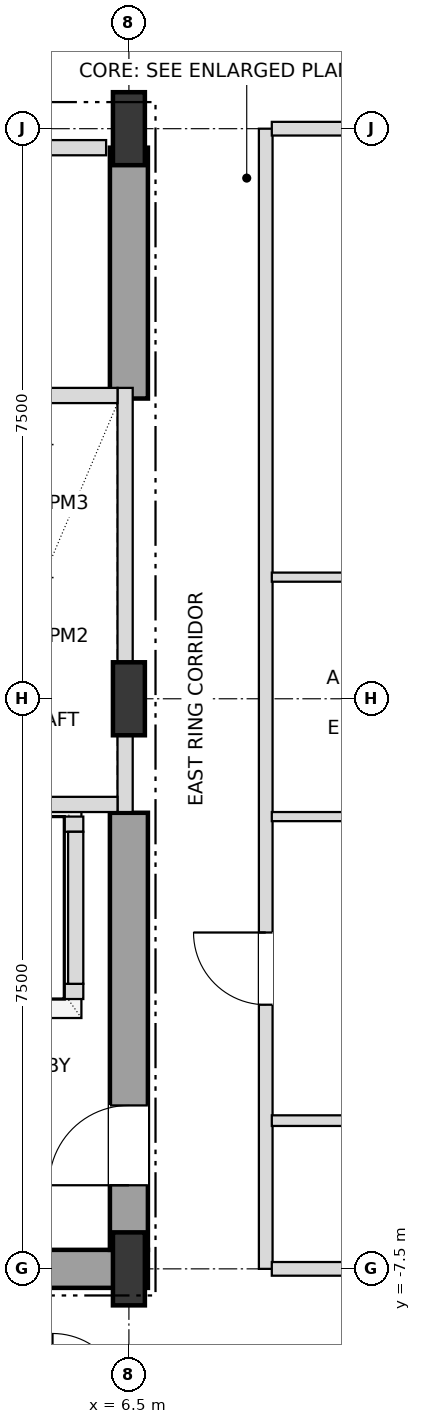
"""IFC4 building model, lengths in metres.
Left out: names, types, materials, properties, quantities, classifications, styles, units other than length and angle.
Written with IfcOpenShell. Run it as: python <this file> out.ifc"""

import sys

from ifc_helpers import new_model, si_unit, direction, frame, frame_2d, origin, origin_2d, place, context, subcontext, project, spatial, rectangle, i_section, extrude, element, fill, save


model = new_model("IFC4")
c1 = context("Model", 3, precision=1e-05, world=origin(), true_north=direction((0.0, 1.0)))
c2 = subcontext(c1, "Body", "Model", "MODEL_VIEW")
j1 = project(units=[si_unit("LENGTHUNIT", "METRE"), si_unit("PLANEANGLEUNIT", "RADIAN")], contexts=[c1])
p1 = place(None, origin())
s1 = spatial("IfcSite", under=j1, at=p1, CompositionType="ELEMENT")
p2 = place(p1, origin())
s2 = spatial("IfcBuilding", under=s1, at=p2, CompositionType="ELEMENT")
p3 = place(p2, frame((0.0, 0.0, 36.0)))
s3 = spatial("IfcBuildingStorey", under=s2, at=p3, CompositionType="ELEMENT", Elevation=36.0)
for number, where, z_axis, x_axis in (
    (1, (6.5, -7.5, 0.0), (0.0, 0.0, 1.0), (1.0, 0.0, 0.0)),
    (2, (6.5, 0.0, 0.0), (0.0, 0.0, 1.0), (1.0, 0.0, 0.0)),
    (3, (6.5, 7.5, 0.0), (0.0, 0.0, 1.0), (1.0, 0.0, 0.0)),
):
    element("IfcColumn", number, at=place(p3, frame(where, z_axis=z_axis, x_axis=x_axis)), inside=s3, PredefinedType="COLUMN", context=c2, shape_type="SweptSolid", body=[
        extrude(i_section(OverallWidth=0.42, OverallDepth=0.96, WebThickness=0.022, FlangeThickness=0.034, at=origin_2d()), origin(), (0.0, 0.0, 1.0), 3.6),
    ])
p4 = place(p3, frame((0.0, -7.5, 0.0), z_axis=(0.0, 0.0, 1.0), x_axis=(1.0, 0.0, 0.0)))
e4 = element("IfcWall", 4, at=p4, inside=s3, PredefinedType="SHEAR", context=c2, shape_type="SweptSolid", body=[
    extrude(rectangle(XDim=6.75, YDim=0.5, at=frame_2d((3.375, 0.0))), origin(), (0.0, 0.0, 1.0), 3.38),
])
p5 = place(p3, frame((6.5, -7.25, 0.0), z_axis=(0.0, 0.0, 1.0), x_axis=(0.0, 1.0, 0.0)))
e5 = element("IfcWall", 5, at=p5, inside=s3, PredefinedType="SHEAR", context=c2, shape_type="SweptSolid", body=[
    extrude(rectangle(XDim=5.75, YDim=0.5, at=frame_2d((2.875, 0.0))), origin(), (0.0, 0.0, 1.0), 3.38),
])
p6 = place(p5, frame((0.85, 0.0, 0.0)))
e6 = element("IfcOpeningElement", 6, at=p6, cuts=e5, PredefinedType="OPENING", context=c2, shape_type="SweptSolid", body=[
    extrude(rectangle(XDim=1.05, YDim=2.15, at=frame_2d((0.525, 1.075))), frame((0.0, 0.26, 0.0), z_axis=(0.0, -1.0, 0.0), x_axis=(1.0, 0.0, 0.0)), (0.0, 0.0, 1.0), 0.52),
])
p7 = place(p3, frame((6.5, 3.95, 0.0), z_axis=(0.0, 0.0, 1.0), x_axis=(0.0, 1.0, 0.0)))
e7 = element("IfcWall", 7, at=p7, inside=s3, PredefinedType="SHEAR", context=c2, shape_type="SweptSolid", body=[
    extrude(rectangle(XDim=3.3, YDim=0.5, at=frame_2d((1.65, 0.0))), origin(), (0.0, 0.0, 1.0), 3.38),
])
p8 = place(p3, frame((6.45, -1.49, 0.0), z_axis=(0.0, 0.0, 1.0), x_axis=(0.0, 1.0, 0.0)))
e8 = element("IfcWall", 8, at=p8, inside=s3, PredefinedType="SOLIDWALL", context=c2, shape_type="SweptSolid", body=[
    extrude(rectangle(XDim=5.58, YDim=0.2, at=frame_2d((2.79, 0.0))), origin(), (0.0, 0.0, 1.0), 2.816),
])
for number, where, z_axis, x_axis in (
    (9, (4.15, -1.39, 0.0), (0.0, 0.0, 1.0), (1.0, 0.0, 0.0)),
    (10, (4.15, 3.99, 0.0), (0.0, 0.0, 1.0), (1.0, 0.0, 0.0)),
):
    element("IfcWall", number, at=place(p3, frame(where, z_axis=z_axis, x_axis=x_axis)), inside=s3, PredefinedType="SOLIDWALL", context=c2, shape_type="SweptSolid", body=[
        extrude(rectangle(XDim=2.2, YDim=0.2, at=frame_2d((1.1, 0.0))), origin(), (0.0, 0.0, 1.0), 3.38),
    ])
p9 = place(p3, frame((1.8, -3.85, 0.0), z_axis=(0.0, 0.0, 1.0), x_axis=(1.0, 0.0, 0.0)))
e11 = element("IfcWall", 11, at=p9, inside=s3, PredefinedType="SOLIDWALL", context=c2, shape_type="SweptSolid", body=[
    extrude(rectangle(XDim=4.1, YDim=0.2, at=frame_2d((2.05, 0.0))), origin(), (0.0, 0.0, 1.0), 3.38),
])
p10 = place(p9, frame((0.45, 0.0, 0.0)))
e12 = element("IfcOpeningElement", 12, at=p10, cuts=e11, PredefinedType="OPENING", context=c2, shape_type="SweptSolid", body=[
    extrude(rectangle(XDim=1.2, YDim=2.2, at=frame_2d((0.6, 1.1))), frame((0.0, 0.11, 0.0), z_axis=(0.0, -1.0, 0.0), x_axis=(1.0, 0.0, 0.0)), (0.0, 0.0, 1.0), 0.22),
])
p11 = place(p9, frame((2.45, 0.0, 0.0)))
e13 = element("IfcOpeningElement", 13, at=p11, cuts=e11, PredefinedType="OPENING", context=c2, shape_type="SweptSolid", body=[
    extrude(rectangle(XDim=1.2, YDim=2.2, at=frame_2d((0.6, 1.1))), frame((0.0, 0.11, 0.0), z_axis=(0.0, -1.0, 0.0), x_axis=(1.0, 0.0, 0.0)), (0.0, 0.0, 1.0), 0.22),
])
p12 = place(p3, frame((1.8, -1.65, 0.0), z_axis=(0.0, 0.0, 1.0), x_axis=(1.0, 0.0, 0.0)))
e14 = element("IfcWall", 14, at=p12, inside=s3, PredefinedType="SOLIDWALL", context=c2, shape_type="SweptSolid", body=[
    extrude(rectangle(XDim=4.1, YDim=0.2, at=frame_2d((2.05, 0.0))), origin(), (0.0, 0.0, 1.0), 3.38),
])
p13 = place(p3, frame((5.8, -3.75, 0.0), z_axis=(0.0, 0.0, 1.0), x_axis=(0.0, 1.0, 0.0)))
e15 = element("IfcWall", 15, at=p13, inside=s3, PredefinedType="SOLIDWALL", context=c2, shape_type="SweptSolid", body=[
    extrude(rectangle(XDim=2.0, YDim=0.2, at=frame_2d((1.0, 0.0))), origin(), (0.0, 0.0, 1.0), 3.38),
])
p14 = place(p3, frame((8.3, -7.5, 0.0), z_axis=(0.0, 0.0, 1.0), x_axis=(0.0, 1.0, 0.0)))
e16 = element("IfcWall", 16, at=p14, inside=s3, PredefinedType="PARTITIONING", context=c2, shape_type="SweptSolid", body=[
    extrude(rectangle(XDim=15.0, YDim=0.18, at=frame_2d((7.5, 0.0))), origin(), (0.0, 0.0, 1.0), 3.38),
])
p15 = place(p14, frame((3.475, 0.0, 0.0)))
e17 = element("IfcOpeningElement", 17, at=p15, cuts=e16, PredefinedType="OPENING", context=c2, shape_type="SweptSolid", body=[
    extrude(rectangle(XDim=0.95, YDim=2.15, at=frame_2d((0.475, 1.075))), frame((0.0, 0.1, 0.0), z_axis=(0.0, -1.0, 0.0), x_axis=(1.0, 0.0, 0.0)), (0.0, 0.0, 1.0), 0.2),
])
p16 = place(p3, frame((8.38, -7.5, 0.0), z_axis=(0.0, 0.0, 1.0), x_axis=(1.0, 0.0, 0.0)))
e18 = element("IfcWall", 18, at=p16, inside=s3, PredefinedType="PARTITIONING", context=c2, shape_type="SweptSolid", body=[
    extrude(rectangle(XDim=7.64, YDim=0.18, at=frame_2d((3.82, 0.0))), origin(), (0.0, 0.0, 1.0), 2.816),
])
p17 = place(p3, frame((8.38, -5.55, 0.0), z_axis=(0.0, 0.0, 1.0), x_axis=(1.0, 0.0, 0.0)))
e19 = element("IfcWall", 19, at=p17, inside=s3, PredefinedType="PARTITIONING", context=c2, shape_type="SweptSolid", body=[
    extrude(rectangle(XDim=7.64, YDim=0.14, at=frame_2d((3.82, 0.0))), origin(), (0.0, 0.0, 1.0), 2.948),
])
p18 = place(p17, frame((3.37, 0.0, 0.0)))
e20 = element("IfcOpeningElement", 20, at=p18, cuts=e19, PredefinedType="OPENING", context=c2, shape_type="SweptSolid", body=[
    extrude(rectangle(XDim=0.9, YDim=2.1, at=frame_2d((0.45, 1.05))), frame((0.0, 0.08, 0.0), z_axis=(0.0, -1.0, 0.0), x_axis=(1.0, 0.0, 0.0)), (0.0, 0.0, 1.0), 0.16),
])
p19 = place(p3, frame((8.38, -1.55, 0.0), z_axis=(0.0, 0.0, 1.0), x_axis=(1.0, 0.0, 0.0)))
e21 = element("IfcWall", 21, at=p19, inside=s3, PredefinedType="PARTITIONING", context=c2, shape_type="SweptSolid", body=[
    extrude(rectangle(XDim=7.64, YDim=0.12, at=frame_2d((3.82, 0.0))), origin(), (0.0, 0.0, 1.0), 2.948),
])
p20 = place(p19, frame((3.345, 0.0, 0.0)))
e22 = element("IfcOpeningElement", 22, at=p20, cuts=e21, PredefinedType="OPENING", context=c2, shape_type="SweptSolid", body=[
    extrude(rectangle(XDim=0.95, YDim=2.1, at=frame_2d((0.475, 1.05))), frame((0.0, 0.07, 0.0), z_axis=(0.0, -1.0, 0.0), x_axis=(1.0, 0.0, 0.0)), (0.0, 0.0, 1.0), 0.14),
])
p21 = place(p3, frame((8.38, 1.6, 0.0), z_axis=(0.0, 0.0, 1.0), x_axis=(1.0, 0.0, 0.0)))
e23 = element("IfcWall", 23, at=p21, inside=s3, PredefinedType="PARTITIONING", context=c2, shape_type="SweptSolid", body=[
    extrude(rectangle(XDim=7.64, YDim=0.12, at=frame_2d((3.82, 0.0))), origin(), (0.0, 0.0, 1.0), 2.948),
])
p22 = place(p21, frame((3.37, 0.0, 0.0)))
e24 = element("IfcOpeningElement", 24, at=p22, cuts=e23, PredefinedType="OPENING", context=c2, shape_type="SweptSolid", body=[
    extrude(rectangle(XDim=0.9, YDim=2.1, at=frame_2d((0.45, 1.05))), frame((0.0, 0.07, 0.0), z_axis=(0.0, -1.0, 0.0), x_axis=(1.0, 0.0, 0.0)), (0.0, 0.0, 1.0), 0.14),
])
p23 = place(p3, frame((4.13, 7.25, 0.0), z_axis=(0.0, 0.0, 1.0), x_axis=(1.0, 0.0, 0.0)))
e25 = element("IfcWall", 25, at=p23, inside=s3, PredefinedType="SOLIDWALL", context=c2, shape_type="SweptSolid", body=[
    extrude(rectangle(XDim=2.07, YDim=0.2, at=frame_2d((1.035, 0.0))), origin(), (0.0, 0.0, 1.0), 3.38),
])
p24 = place(p3, frame((8.38, 7.5, 0.0), z_axis=(0.0, 0.0, 1.0), x_axis=(1.0, 0.0, 0.0)))
e26 = element("IfcWall", 26, at=p24, inside=s3, PredefinedType="PARTITIONING", context=c2, shape_type="SweptSolid", body=[
    extrude(rectangle(XDim=7.64, YDim=0.18, at=frame_2d((3.82, 0.0))), origin(), (0.0, 0.0, 1.0), 2.816),
])
p25 = place(p6, origin())
e27 = element("IfcDoor", 27, at=p25, inside=s3, OperationType="SINGLE_SWING_LEFT", PredefinedType="DOOR", context=c2, shape_type="SweptSolid", body=[
    extrude(rectangle(XDim=1.05, YDim=2.15, at=frame_2d((0.525, 1.075))), frame((0.0, 0.025, 0.0), z_axis=(0.0, -1.0, 0.0), x_axis=(1.0, 0.0, 0.0)), (0.0, 0.0, 1.0), 0.05),
])
fill(e6, e27)
p26 = place(p15, origin())
e28 = element("IfcDoor", 28, at=p26, inside=s3, OperationType="SINGLE_SWING_RIGHT", PredefinedType="DOOR", context=c2, shape_type="SweptSolid", body=[
    extrude(rectangle(XDim=0.95, YDim=2.15, at=frame_2d((0.475, 1.075))), frame((0.0, 0.025, 0.0), z_axis=(0.0, -1.0, 0.0), x_axis=(1.0, 0.0, 0.0)), (0.0, 0.0, 1.0), 0.05),
])
fill(e17, e28)
save(model, sys.argv[1])
